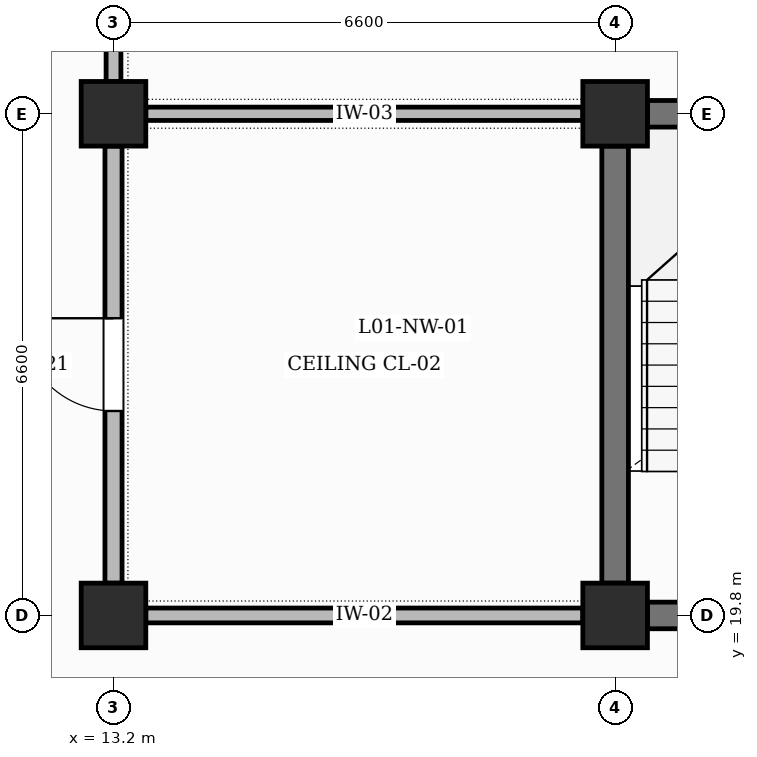
"""IFC4 building model, lengths in metres.
Left out: names, types, materials, properties, quantities, classifications, styles, units other than length and angle.
Written with IfcOpenShell. Run it as: python <this file> out.ifc"""

import sys

from ifc_helpers import new_model, si_unit, direction, frame, frame_2d, origin, origin_2d, place, context, subcontext, project, spatial, rectangle, extrude, element, fill, save


model = new_model("IFC4")
c1 = context("Model", 3, precision=1e-05, world=origin(), true_north=direction((0.0, 1.0)))
c2 = subcontext(c1, "Body", "Model", "MODEL_VIEW")
j1 = project(units=[si_unit("LENGTHUNIT", "METRE"), si_unit("PLANEANGLEUNIT", "RADIAN")], contexts=[c1])
p1 = place(None, origin())
s1 = spatial("IfcSite", under=j1, at=p1, CompositionType="ELEMENT")
p2 = place(p1, origin())
s2 = spatial("IfcBuilding", under=s1, at=p2, CompositionType="ELEMENT")
p3 = place(p2, frame((0.0, 0.0, 5.4)))
s3 = spatial("IfcBuildingStorey", under=s2, at=p3, CompositionType="ELEMENT", Elevation=5.4)
for number, where, z_axis, x_axis in (
    (1, (13.2, 19.8, 0.0), (0.0, 0.0, 1.0), (1.0, 0.0, 0.0)),
    (2, (13.2, 26.4, 0.0), (0.0, 0.0, 1.0), (1.0, 0.0, 0.0)),
    (3, (19.8, 19.8, 0.0), (0.0, 0.0, 1.0), (1.0, 0.0, 0.0)),
    (4, (19.8, 26.4, 0.0), (0.0, 0.0, 1.0), (1.0, 0.0, 0.0)),
):
    element("IfcColumn", number, at=place(p3, frame(where, z_axis=z_axis, x_axis=x_axis)), inside=s3, PredefinedType="COLUMN", context=c2, shape_type="SweptSolid", body=[
        extrude(rectangle(XDim=0.85, YDim=0.85, at=origin_2d()), origin(), (0.0, 0.0, 1.0), 4.8),
    ])
p4 = place(p3, frame((20.225, 19.8, 0.0), z_axis=(0.0, 0.0, 1.0), x_axis=(1.0, 0.0, 0.0)))
e5 = element("IfcWall", 5, at=p4, inside=s3, PredefinedType="SHEAR", context=c2, shape_type="SweptSolid", body=[
    extrude(rectangle(XDim=5.75, YDim=0.35, at=frame_2d((2.875, 0.0))), origin(), (0.0, 0.0, 1.0), 3.6),
])
p5 = place(p4, frame((2.325, 0.0, 0.0)))
e6 = element("IfcOpeningElement", 6, at=p5, cuts=e5, PredefinedType="OPENING", context=c2, shape_type="SweptSolid", body=[
    extrude(rectangle(XDim=1.1, YDim=2.15, at=frame_2d((0.55, 1.075))), frame((0.0, 0.185, 0.0), z_axis=(0.0, -1.0, 0.0), x_axis=(1.0, 0.0, 0.0)), (0.0, 0.0, 1.0), 0.37),
])
p6 = place(p3, frame((20.225, 26.4, 0.0), z_axis=(0.0, 0.0, 1.0), x_axis=(1.0, 0.0, 0.0)))
e7 = element("IfcWall", 7, at=p6, inside=s3, PredefinedType="SHEAR", context=c2, shape_type="SweptSolid", body=[
    extrude(rectangle(XDim=5.775, YDim=0.35, at=frame_2d((2.887, 0.0))), origin(), (0.0, 0.0, 1.0), 3.7),
])
p7 = place(p3, frame((19.8, 20.225, 0.0), z_axis=(0.0, 0.0, 1.0), x_axis=(0.0, 1.0, 0.0)))
e8 = element("IfcWall", 8, at=p7, inside=s3, PredefinedType="SHEAR", context=c2, shape_type="SweptSolid", body=[
    extrude(rectangle(XDim=5.75, YDim=0.35, at=frame_2d((2.875, 0.0))), origin(), (0.0, 0.0, 1.0), 3.7),
])
p8 = place(p3, frame((13.2, 20.225, 0.0), z_axis=(0.0, 0.0, 1.0), x_axis=(0.0, 1.0, 0.0)))
e9 = element("IfcWall", 9, at=p8, inside=s3, PredefinedType="PARTITIONING", context=c2, shape_type="SweptSolid", body=[
    extrude(rectangle(XDim=5.75, YDim=0.225, at=frame_2d((2.875, 0.0))), origin(), (0.0, 0.0, 1.0), 3.7),
])
p9 = place(p8, frame((2.265, 0.0, 0.0)))
e10 = element("IfcOpeningElement", 10, at=p9, cuts=e9, PredefinedType="OPENING", context=c2, shape_type="SweptSolid", body=[
    extrude(rectangle(XDim=1.22, YDim=2.15, at=frame_2d((0.61, 1.075))), frame((0.0, 0.123, 0.0), z_axis=(0.0, -1.0, 0.0), x_axis=(1.0, 0.0, 0.0)), (0.0, 0.0, 1.0), 0.245),
])
p10 = place(p3, frame((13.2, 26.825, 0.0), z_axis=(0.0, 0.0, 1.0), x_axis=(0.0, 1.0, 0.0)))
e11 = element("IfcWall", 11, at=p10, inside=s3, PredefinedType="PARTITIONING", context=c2, shape_type="SweptSolid", body=[
    extrude(rectangle(XDim=5.75, YDim=0.195, at=frame_2d((2.875, 0.0))), origin(), (0.0, 0.0, 1.0), 3.7),
])
p11 = place(p10, frame((2.165, 0.0, 0.0)))
e12 = element("IfcOpeningElement", 12, at=p11, cuts=e11, PredefinedType="OPENING", context=c2, shape_type="SweptSolid", body=[
    extrude(rectangle(XDim=1.42, YDim=2.2, at=frame_2d((0.71, 1.1))), frame((0.0, 0.107, 0.0), z_axis=(0.0, -1.0, 0.0), x_axis=(1.0, 0.0, 0.0)), (0.0, 0.0, 1.0), 0.215),
])
p12 = place(p3, frame((13.625, 19.8, 0.0), z_axis=(0.0, 0.0, 1.0), x_axis=(1.0, 0.0, 0.0)))
e13 = element("IfcWall", 13, at=p12, inside=s3, PredefinedType="PARTITIONING", context=c2, shape_type="SweptSolid", body=[
    extrude(rectangle(XDim=5.75, YDim=0.195, at=frame_2d((2.875, 0.0))), origin(), (0.0, 0.0, 1.0), 3.7),
])
p13 = place(p3, frame((13.625, 26.4, 0.0), z_axis=(0.0, 0.0, 1.0), x_axis=(1.0, 0.0, 0.0)))
e14 = element("IfcWall", 14, at=p13, inside=s3, PredefinedType="PARTITIONING", context=c2, shape_type="SweptSolid", body=[
    extrude(rectangle(XDim=5.75, YDim=0.175, at=frame_2d((2.875, 0.0))), origin(), (0.0, 0.0, 1.0), 3.6),
])
p14 = place(p9, origin())
e15 = element("IfcDoor", 15, at=p14, inside=s3, OperationType="SINGLE_SWING_RIGHT", PredefinedType="DOOR", context=c2, shape_type="SweptSolid", body=[
    extrude(rectangle(XDim=1.22, YDim=2.15, at=frame_2d((0.61, 1.075))), frame((0.0, 0.025, 0.0), z_axis=(0.0, -1.0, 0.0), x_axis=(1.0, 0.0, 0.0)), (0.0, 0.0, 1.0), 0.05),
])
fill(e10, e15)
save(model, sys.argv[1])
